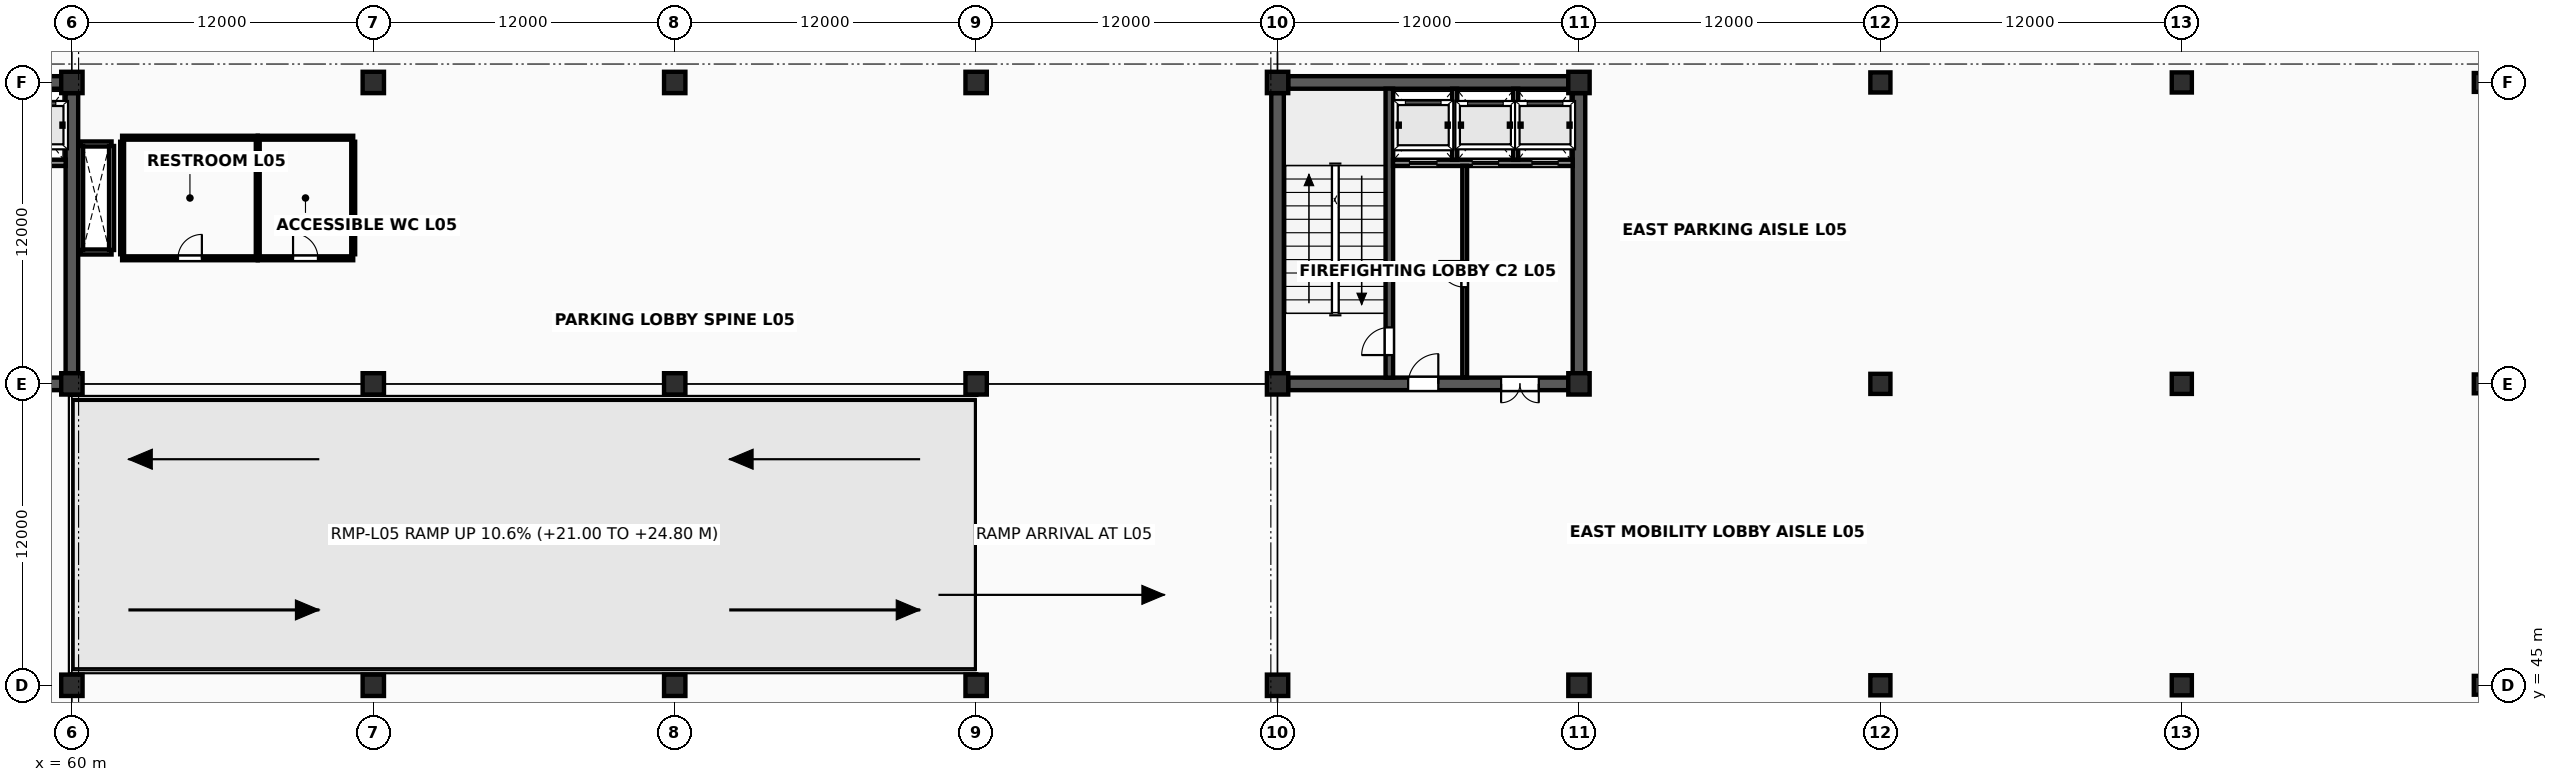
"""IFC4 building model, lengths in metres.
Left out: names, types, materials, properties, quantities, classifications, styles, units other than length and angle.
Written with IfcOpenShell. Run it as: python <this file> out.ifc"""

import sys

from ifc_helpers import new_model, si_unit, direction, frame, frame_2d, origin, origin_2d, place, context, subcontext, project, spatial, rectangle, extrude, element, fill, save


model = new_model("IFC4")
c1 = context("Model", 3, precision=1e-05, world=origin(), true_north=direction((0.0, 1.0)))
c2 = subcontext(c1, "Body", "Model", "MODEL_VIEW")
j1 = project(units=[si_unit("LENGTHUNIT", "METRE"), si_unit("PLANEANGLEUNIT", "RADIAN")], contexts=[c1])
p1 = place(None, origin())
s1 = spatial("IfcSite", under=j1, at=p1, CompositionType="ELEMENT")
p2 = place(p1, origin())
s2 = spatial("IfcBuilding", under=s1, at=p2, CompositionType="ELEMENT")
p3 = place(p2, frame((0.0, 0.0, 21.0)))
s3 = spatial("IfcBuildingStorey", under=s2, at=p3, CompositionType="ELEMENT", Elevation=21.0)
for number, where, z_axis, x_axis in (
    (1, (60.0, 45.0, 0.0), (0.0, 0.0, 1.0), (1.0, 0.0, 0.0)),
    (2, (60.0, 57.0, 0.0), (0.0, 0.0, 1.0), (1.0, 0.0, 0.0)),
    (3, (60.0, 69.0, 0.0), (0.0, 0.0, 1.0), (1.0, 0.0, 0.0)),
    (4, (72.0, 45.0, 0.0), (0.0, 0.0, 1.0), (1.0, 0.0, 0.0)),
    (5, (72.0, 57.0, 0.0), (0.0, 0.0, 1.0), (1.0, 0.0, 0.0)),
    (6, (72.0, 69.0, 0.0), (0.0, 0.0, 1.0), (1.0, 0.0, 0.0)),
    (7, (84.0, 45.0, 0.0), (0.0, 0.0, 1.0), (1.0, 0.0, 0.0)),
    (8, (84.0, 57.0, 0.0), (0.0, 0.0, 1.0), (1.0, 0.0, 0.0)),
    (9, (84.0, 69.0, 0.0), (0.0, 0.0, 1.0), (1.0, 0.0, 0.0)),
    (10, (96.0, 45.0, 0.0), (0.0, 0.0, 1.0), (1.0, 0.0, 0.0)),
    (11, (96.0, 57.0, 0.0), (0.0, 0.0, 1.0), (1.0, 0.0, 0.0)),
    (12, (96.0, 69.0, 0.0), (0.0, 0.0, 1.0), (1.0, 0.0, 0.0)),
    (13, (108.0, 45.0, 0.0), (0.0, 0.0, 1.0), (1.0, 0.0, 0.0)),
    (14, (108.0, 57.0, 0.0), (0.0, 0.0, 1.0), (1.0, 0.0, 0.0)),
    (15, (108.0, 69.0, 0.0), (0.0, 0.0, 1.0), (1.0, 0.0, 0.0)),
    (16, (120.0, 45.0, 0.0), (0.0, 0.0, 1.0), (1.0, 0.0, 0.0)),
    (17, (120.0, 57.0, 0.0), (0.0, 0.0, 1.0), (1.0, 0.0, 0.0)),
    (18, (120.0, 69.0, 0.0), (0.0, 0.0, 1.0), (1.0, 0.0, 0.0)),
):
    element("IfcColumn", number, at=place(p3, frame(where, z_axis=z_axis, x_axis=x_axis)), inside=s3, PredefinedType="COLUMN", context=c2, shape_type="SweptSolid", body=[
        extrude(rectangle(XDim=0.85, YDim=0.85, at=origin_2d()), origin(), (0.0, 0.0, 1.0), 3.8),
    ])
for number, where, z_axis, x_axis in (
    (19, (132.0, 45.0, 0.0), (0.0, 0.0, 1.0), (1.0, 0.0, 0.0)),
    (20, (132.0, 57.0, 0.0), (0.0, 0.0, 1.0), (1.0, 0.0, 0.0)),
    (21, (132.0, 69.0, 0.0), (0.0, 0.0, 1.0), (1.0, 0.0, 0.0)),
    (22, (144.0, 45.0, 0.0), (0.0, 0.0, 1.0), (1.0, 0.0, 0.0)),
    (23, (144.0, 57.0, 0.0), (0.0, 0.0, 1.0), (1.0, 0.0, 0.0)),
    (24, (144.0, 69.0, 0.0), (0.0, 0.0, 1.0), (1.0, 0.0, 0.0)),
):
    element("IfcColumn", number, at=place(p3, frame(where, z_axis=z_axis, x_axis=x_axis)), inside=s3, PredefinedType="COLUMN", context=c2, shape_type="SweptSolid", body=[
        extrude(rectangle(XDim=0.8, YDim=0.8, at=origin_2d()), origin(), (0.0, 0.0, 1.0), 3.8),
    ])
for number, where, z_axis, x_axis in (
    (25, (156.0, 45.0, 0.0), (0.0, 0.0, 1.0), (1.0, 0.0, 0.0)),
    (26, (156.0, 57.0, 0.0), (0.0, 0.0, 1.0), (1.0, 0.0, 0.0)),
    (27, (156.0, 69.0, 0.0), (0.0, 0.0, 1.0), (1.0, 0.0, 0.0)),
):
    element("IfcColumn", number, at=place(p3, frame(where, z_axis=z_axis, x_axis=x_axis)), inside=s3, PredefinedType="COLUMN", context=c2, shape_type="SweptSolid", body=[
        extrude(rectangle(XDim=0.75, YDim=0.75, at=origin_2d()), origin(), (0.0, 0.0, 1.0), 3.8),
    ])
for number, where, z_axis, x_axis in (
    (28, (60.347, 62.25, 0.0), (0.0, 0.0, 1.0), (1.0, 0.0, 0.0)),
    (29, (60.347, 66.55, 0.0), (0.0, 0.0, 1.0), (1.0, 0.0, 0.0)),
):
    element("IfcWall", number, at=place(p3, frame(where, z_axis=z_axis, x_axis=x_axis)), inside=s3, PredefinedType="SOLIDWALL", context=c2, shape_type="SweptSolid", body=[
        extrude(rectangle(XDim=1.233, YDim=0.2, at=frame_2d((0.617, 0.0))), origin(), (0.0, 0.0, 1.0), 3.638),
    ])
for number, where, z_axis, x_axis in (
    (30, (60.347, 62.33, 0.0), (0.0, 0.0, 1.0), (0.0, 1.0, 0.0)),
    (31, (61.58, 62.33, 0.0), (0.0, 0.0, 1.0), (0.0, 1.0, 0.0)),
):
    element("IfcWall", number, at=place(p3, frame(where, z_axis=z_axis, x_axis=x_axis)), inside=s3, PredefinedType="SOLIDWALL", context=c2, shape_type="SweptSolid", body=[
        extrude(rectangle(XDim=4.14, YDim=0.2, at=frame_2d((2.07, 0.0))), origin(), (0.0, 0.0, 1.0), 3.638),
    ])
p4 = place(p3, frame((48.422, 57.0, 0.0), z_axis=(0.0, 0.0, 1.0), x_axis=(1.0, 0.0, 0.0)))
e32 = element("IfcWall", 32, at=p4, inside=s3, PredefinedType="SHEAR", context=c2, shape_type="SweptSolid", body=[
    extrude(rectangle(XDim=11.156, YDim=0.5, at=frame_2d((5.578, 0.0))), origin(), (0.0, 0.0, 1.0), 3.638),
])
p5 = place(p4, frame((4.778, 0.0, 0.0)))
e33 = element("IfcOpeningElement", 33, at=p5, cuts=e32, PredefinedType="OPENING", context=c2, shape_type="SweptSolid", body=[
    extrude(rectangle(XDim=1.2, YDim=2.2, at=frame_2d((0.6, 1.1))), frame((0.0, 0.265, 0.0), z_axis=(0.0, -1.0, 0.0), x_axis=(1.0, 0.0, 0.0)), (0.0, 0.0, 1.0), 0.53),
])
p6 = place(p4, frame((8.478, 0.0, 0.0)))
e34 = element("IfcOpeningElement", 34, at=p6, cuts=e32, PredefinedType="OPENING", context=c2, shape_type="SweptSolid", body=[
    extrude(rectangle(XDim=1.5, YDim=2.25, at=frame_2d((0.75, 1.125))), frame((0.0, 0.265, 0.0), z_axis=(0.0, -1.0, 0.0), x_axis=(1.0, 0.0, 0.0)), (0.0, 0.0, 1.0), 0.53),
])
for number, where, z_axis, x_axis in (
    (35, (48.422, 69.0, 0.0), (0.0, 0.0, 1.0), (1.0, 0.0, 0.0)),
    (36, (60.0, 57.422, 0.0), (0.0, 0.0, 1.0), (0.0, 1.0, 0.0)),
):
    element("IfcWall", number, at=place(p3, frame(where, z_axis=z_axis, x_axis=x_axis)), inside=s3, PredefinedType="SHEAR", context=c2, shape_type="SweptSolid", body=[
        extrude(rectangle(XDim=11.156, YDim=0.5, at=frame_2d((5.578, 0.0))), origin(), (0.0, 0.0, 1.0), 3.638),
    ])
p7 = place(p3, frame((52.597, 65.8, 0.0), z_axis=(0.0, 0.0, 1.0), x_axis=(1.0, 0.0, 0.0)))
e37 = element("IfcWall", 37, at=p7, inside=s3, PredefinedType="SOLIDWALL", context=c2, shape_type="SweptSolid", body=[
    extrude(rectangle(XDim=7.156, YDim=0.25, at=frame_2d((3.578, 0.0))), origin(), (0.0, 0.0, 1.0), 3.638),
])
p8 = place(p7, frame((0.653, 0.0, 0.0)))
e38 = element("IfcOpeningElement", 38, at=p8, cuts=e37, PredefinedType="OPENING", context=c2, shape_type="SweptSolid", body=[
    extrude(rectangle(XDim=1.1, YDim=2.24, at=frame_2d((0.55, 1.12))), frame((0.0, 0.14, 0.0), z_axis=(0.0, -1.0, 0.0), x_axis=(1.0, 0.0, 0.0)), (0.0, 0.0, 1.0), 0.28),
])
p9 = place(p7, frame((3.153, 0.0, 0.0)))
e39 = element("IfcOpeningElement", 39, at=p9, cuts=e37, PredefinedType="OPENING", context=c2, shape_type="SweptSolid", body=[
    extrude(rectangle(XDim=1.05, YDim=2.2, at=frame_2d((0.525, 1.1))), frame((0.0, 0.14, 0.0), z_axis=(0.0, -1.0, 0.0), x_axis=(1.0, 0.0, 0.0)), (0.0, 0.0, 1.0), 0.28),
])
p10 = place(p7, frame((5.528, 0.0, 0.0)))
e40 = element("IfcOpeningElement", 40, at=p10, cuts=e37, PredefinedType="OPENING", context=c2, shape_type="SweptSolid", body=[
    extrude(rectangle(XDim=1.05, YDim=2.2, at=frame_2d((0.525, 1.1))), frame((0.0, 0.14, 0.0), z_axis=(0.0, -1.0, 0.0), x_axis=(1.0, 0.0, 0.0)), (0.0, 0.0, 1.0), 0.28),
])
p11 = place(p3, frame((108.422, 57.0, 0.0), z_axis=(0.0, 0.0, 1.0), x_axis=(1.0, 0.0, 0.0)))
e41 = element("IfcWall", 41, at=p11, inside=s3, PredefinedType="SHEAR", context=c2, shape_type="SweptSolid", body=[
    extrude(rectangle(XDim=11.156, YDim=0.5, at=frame_2d((5.578, 0.0))), origin(), (0.0, 0.0, 1.0), 3.638),
])
p12 = place(p11, frame((4.778, 0.0, 0.0)))
e42 = element("IfcOpeningElement", 42, at=p12, cuts=e41, PredefinedType="OPENING", context=c2, shape_type="SweptSolid", body=[
    extrude(rectangle(XDim=1.2, YDim=2.2, at=frame_2d((0.6, 1.1))), frame((0.0, 0.265, 0.0), z_axis=(0.0, -1.0, 0.0), x_axis=(1.0, 0.0, 0.0)), (0.0, 0.0, 1.0), 0.53),
])
p13 = place(p11, frame((8.478, 0.0, 0.0)))
e43 = element("IfcOpeningElement", 43, at=p13, cuts=e41, PredefinedType="OPENING", context=c2, shape_type="SweptSolid", body=[
    extrude(rectangle(XDim=1.5, YDim=2.25, at=frame_2d((0.75, 1.125))), frame((0.0, 0.265, 0.0), z_axis=(0.0, -1.0, 0.0), x_axis=(1.0, 0.0, 0.0)), (0.0, 0.0, 1.0), 0.53),
])
for number, where, z_axis, x_axis in (
    (44, (108.422, 69.0, 0.0), (0.0, 0.0, 1.0), (1.0, 0.0, 0.0)),
    (45, (108.0, 57.422, 0.0), (0.0, 0.0, 1.0), (0.0, 1.0, 0.0)),
    (46, (120.0, 57.422, 0.0), (0.0, 0.0, 1.0), (0.0, 1.0, 0.0)),
):
    element("IfcWall", number, at=place(p3, frame(where, z_axis=z_axis, x_axis=x_axis)), inside=s3, PredefinedType="SHEAR", context=c2, shape_type="SweptSolid", body=[
        extrude(rectangle(XDim=11.156, YDim=0.5, at=frame_2d((5.578, 0.0))), origin(), (0.0, 0.0, 1.0), 3.638),
    ])
p14 = place(p3, frame((112.45, 57.247, 0.0), z_axis=(0.0, 0.0, 1.0), x_axis=(0.0, 1.0, 0.0)))
e47 = element("IfcWall", 47, at=p14, inside=s3, PredefinedType="SHEAR", context=c2, shape_type="SweptSolid", body=[
    extrude(rectangle(XDim=11.506, YDim=0.3, at=frame_2d((5.753, 0.0))), origin(), (0.0, 0.0, 1.0), 3.638),
])
p15 = place(p14, frame((0.9, 0.0, 0.0)))
e48 = element("IfcOpeningElement", 48, at=p15, cuts=e47, PredefinedType="OPENING", context=c2, shape_type="SweptSolid", body=[
    extrude(rectangle(XDim=1.1, YDim=2.2, at=frame_2d((0.55, 1.1))), frame((0.0, 0.165, 0.0), z_axis=(0.0, -1.0, 0.0), x_axis=(1.0, 0.0, 0.0)), (0.0, 0.0, 1.0), 0.33),
])
p16 = place(p3, frame((112.597, 65.8, 0.0), z_axis=(0.0, 0.0, 1.0), x_axis=(1.0, 0.0, 0.0)))
e49 = element("IfcWall", 49, at=p16, inside=s3, PredefinedType="SOLIDWALL", context=c2, shape_type="SweptSolid", body=[
    extrude(rectangle(XDim=7.156, YDim=0.25, at=frame_2d((3.578, 0.0))), origin(), (0.0, 0.0, 1.0), 3.638),
])
p17 = place(p16, frame((0.653, 0.0, 0.0)))
e50 = element("IfcOpeningElement", 50, at=p17, cuts=e49, PredefinedType="OPENING", context=c2, shape_type="SweptSolid", body=[
    extrude(rectangle(XDim=1.1, YDim=2.24, at=frame_2d((0.55, 1.12))), frame((0.0, 0.14, 0.0), z_axis=(0.0, -1.0, 0.0), x_axis=(1.0, 0.0, 0.0)), (0.0, 0.0, 1.0), 0.28),
])
p18 = place(p16, frame((3.153, 0.0, 0.0)))
e51 = element("IfcOpeningElement", 51, at=p18, cuts=e49, PredefinedType="OPENING", context=c2, shape_type="SweptSolid", body=[
    extrude(rectangle(XDim=1.05, YDim=2.2, at=frame_2d((0.525, 1.1))), frame((0.0, 0.14, 0.0), z_axis=(0.0, -1.0, 0.0), x_axis=(1.0, 0.0, 0.0)), (0.0, 0.0, 1.0), 0.28),
])
p19 = place(p16, frame((5.528, 0.0, 0.0)))
e52 = element("IfcOpeningElement", 52, at=p19, cuts=e49, PredefinedType="OPENING", context=c2, shape_type="SweptSolid", body=[
    extrude(rectangle(XDim=1.05, YDim=2.2, at=frame_2d((0.525, 1.1))), frame((0.0, 0.14, 0.0), z_axis=(0.0, -1.0, 0.0), x_axis=(1.0, 0.0, 0.0)), (0.0, 0.0, 1.0), 0.28),
])
for number, where, z_axis, x_axis in (
    (53, (115.05, 65.92, 0.0), (0.0, 0.0, 1.0), (0.0, 1.0, 0.0)),
    (54, (117.48, 65.92, 0.0), (0.0, 0.0, 1.0), (0.0, 1.0, 0.0)),
):
    element("IfcWall", number, at=place(p3, frame(where, z_axis=z_axis, x_axis=x_axis)), inside=s3, PredefinedType="SOLIDWALL", context=c2, shape_type="SweptSolid", body=[
        extrude(rectangle(XDim=2.83, YDim=0.2, at=frame_2d((1.415, 0.0))), origin(), (0.0, 0.0, 1.0), 3.628),
    ])
p20 = place(p3, frame((115.45, 57.25, 0.0), z_axis=(0.0, 0.0, 1.0), x_axis=(0.0, 1.0, 0.0)))
e55 = element("IfcWall", 55, at=p20, inside=s3, PredefinedType="SOLIDWALL", context=c2, shape_type="SweptSolid", body=[
    extrude(rectangle(XDim=8.43, YDim=0.19, at=frame_2d((4.215, 0.0))), origin(), (0.0, 0.0, 1.0), 3.628),
])
p21 = place(p20, frame((3.6, 0.0, 0.0)))
e56 = element("IfcOpeningElement", 56, at=p21, cuts=e55, PredefinedType="OPENING", context=c2, shape_type="SweptSolid", body=[
    extrude(rectangle(XDim=1.04, YDim=2.18, at=frame_2d((0.52, 1.09))), frame((0.0, 0.11, 0.0), z_axis=(0.0, -1.0, 0.0), x_axis=(1.0, 0.0, 0.0)), (0.0, 0.0, 1.0), 0.22),
])
p22 = place(p3, frame((62.0, 62.0, 0.0), z_axis=(0.0, 0.0, 1.0), x_axis=(1.0, 0.0, 0.0)))
e57 = element("IfcWall", 57, at=p22, inside=s3, PredefinedType="PLUMBINGWALL", context=c2, shape_type="SweptSolid", body=[
    extrude(rectangle(XDim=5.4, YDim=0.155, at=frame_2d((2.7, 0.0))), origin(), (0.0, 0.0, 1.0), 2.75),
])
p23 = place(p22, frame((2.225, 0.0, 0.0)))
e58 = element("IfcOpeningElement", 58, at=p23, cuts=e57, PredefinedType="OPENING", context=c2, shape_type="SweptSolid", body=[
    extrude(rectangle(XDim=0.95, YDim=2.13, at=frame_2d((0.475, 1.065))), frame((0.0, 0.093, 0.0), z_axis=(0.0, -1.0, 0.0), x_axis=(1.0, 0.0, 0.0)), (0.0, 0.0, 1.0), 0.185),
])
p24 = place(p3, frame((62.0, 66.8, 0.0), z_axis=(0.0, 0.0, 1.0), x_axis=(1.0, 0.0, 0.0)))
e59 = element("IfcWall", 59, at=p24, inside=s3, PredefinedType="PLUMBINGWALL", context=c2, shape_type="SweptSolid", body=[
    extrude(rectangle(XDim=5.4, YDim=0.155, at=frame_2d((2.7, 0.0))), origin(), (0.0, 0.0, 1.0), 2.75),
])
for number, where, z_axis, x_axis in (
    (60, (62.0, 62.16, 0.0), (0.0, 0.0, 1.0), (0.0, 1.0, 0.0)),
    (61, (67.4, 62.16, 0.0), (0.0, 0.0, 1.0), (0.0, 1.0, 0.0)),
):
    element("IfcWall", number, at=place(p3, frame(where, z_axis=z_axis, x_axis=x_axis)), inside=s3, PredefinedType="PLUMBINGWALL", context=c2, shape_type="SweptSolid", body=[
        extrude(rectangle(XDim=4.48, YDim=0.155, at=frame_2d((2.24, 0.0))), origin(), (0.0, 0.0, 1.0), 2.75),
    ])
p25 = place(p3, frame((67.4, 62.0, 0.0), z_axis=(0.0, 0.0, 1.0), x_axis=(1.0, 0.0, 0.0)))
e62 = element("IfcWall", 62, at=p25, inside=s3, PredefinedType="PLUMBINGWALL", context=c2, shape_type="SweptSolid", body=[
    extrude(rectangle(XDim=3.8, YDim=0.155, at=frame_2d((1.9, 0.0))), origin(), (0.0, 0.0, 1.0), 2.75),
])
p26 = place(p25, frame((1.405, 0.0, 0.0)))
e63 = element("IfcOpeningElement", 63, at=p26, cuts=e62, PredefinedType="OPENING", context=c2, shape_type="SweptSolid", body=[
    extrude(rectangle(XDim=0.99, YDim=2.15, at=frame_2d((0.495, 1.075))), frame((0.0, 0.093, 0.0), z_axis=(0.0, -1.0, 0.0), x_axis=(1.0, 0.0, 0.0)), (0.0, 0.0, 1.0), 0.185),
])
p27 = place(p3, frame((67.4, 66.8, 0.0), z_axis=(0.0, 0.0, 1.0), x_axis=(1.0, 0.0, 0.0)))
e64 = element("IfcWall", 64, at=p27, inside=s3, PredefinedType="PLUMBINGWALL", context=c2, shape_type="SweptSolid", body=[
    extrude(rectangle(XDim=3.8, YDim=0.155, at=frame_2d((1.9, 0.0))), origin(), (0.0, 0.0, 1.0), 2.75),
])
p28 = place(p3, frame((71.2, 62.16, 0.0), z_axis=(0.0, 0.0, 1.0), x_axis=(0.0, 1.0, 0.0)))
e65 = element("IfcWall", 65, at=p28, inside=s3, PredefinedType="PLUMBINGWALL", context=c2, shape_type="SweptSolid", body=[
    extrude(rectangle(XDim=4.48, YDim=0.155, at=frame_2d((2.24, 0.0))), origin(), (0.0, 0.0, 1.0), 2.75),
])
p29 = place(p15, origin())
e66 = element("IfcDoor", 66, at=p29, inside=s3, OperationType="SINGLE_SWING_LEFT", PredefinedType="DOOR", context=c2, shape_type="SweptSolid", body=[
    extrude(rectangle(XDim=1.1, YDim=2.2, at=frame_2d((0.55, 1.1))), frame((0.0, 0.025, 0.0), z_axis=(0.0, -1.0, 0.0), x_axis=(1.0, 0.0, 0.0)), (0.0, 0.0, 1.0), 0.05),
])
fill(e48, e66)
p30 = place(p21, origin())
e67 = element("IfcDoor", 67, at=p30, inside=s3, OperationType="SINGLE_SWING_RIGHT", PredefinedType="DOOR", context=c2, shape_type="SweptSolid", body=[
    extrude(rectangle(XDim=1.04, YDim=2.18, at=frame_2d((0.52, 1.09))), frame((0.0, 0.025, 0.0), z_axis=(0.0, -1.0, 0.0), x_axis=(1.0, 0.0, 0.0)), (0.0, 0.0, 1.0), 0.05),
])
fill(e56, e67)
p31 = place(p12, origin())
e68 = element("IfcDoor", 68, at=p31, inside=s3, OperationType="SINGLE_SWING_RIGHT", PredefinedType="DOOR", context=c2, shape_type="SweptSolid", body=[
    extrude(rectangle(XDim=1.2, YDim=2.2, at=frame_2d((0.6, 1.1))), frame((0.0, 0.025, 0.0), z_axis=(0.0, -1.0, 0.0), x_axis=(1.0, 0.0, 0.0)), (0.0, 0.0, 1.0), 0.05),
])
fill(e42, e68)
p32 = place(p13, origin())
e69 = element("IfcDoor", 69, at=p32, inside=s3, OperationType="DOUBLE_DOOR_SINGLE_SWING", PredefinedType="DOOR", context=c2, shape_type="SweptSolid", body=[
    extrude(rectangle(XDim=1.5, YDim=2.25, at=frame_2d((0.75, 1.125))), frame((0.0, 0.025, 0.0), z_axis=(0.0, -1.0, 0.0), x_axis=(1.0, 0.0, 0.0)), (0.0, 0.0, 1.0), 0.05),
])
fill(e43, e69)
p33 = place(p17, origin())
e70 = element("IfcDoor", 70, at=p33, inside=s3, OperationType="SLIDING_TO_LEFT", PredefinedType="USERDEFINED", context=c2, shape_type="SweptSolid", body=[
    extrude(rectangle(XDim=1.1, YDim=2.24, at=frame_2d((0.55, 1.12))), frame((0.0, 0.025, 0.0), z_axis=(0.0, -1.0, 0.0), x_axis=(1.0, 0.0, 0.0)), (0.0, 0.0, 1.0), 0.05),
])
fill(e50, e70)
p34 = place(p18, origin())
e71 = element("IfcDoor", 71, at=p34, inside=s3, OperationType="SLIDING_TO_LEFT", PredefinedType="USERDEFINED", context=c2, shape_type="SweptSolid", body=[
    extrude(rectangle(XDim=1.05, YDim=2.2, at=frame_2d((0.525, 1.1))), frame((0.0, 0.025, 0.0), z_axis=(0.0, -1.0, 0.0), x_axis=(1.0, 0.0, 0.0)), (0.0, 0.0, 1.0), 0.05),
])
fill(e51, e71)
p35 = place(p19, origin())
e72 = element("IfcDoor", 72, at=p35, inside=s3, OperationType="SLIDING_TO_LEFT", PredefinedType="USERDEFINED", context=c2, shape_type="SweptSolid", body=[
    extrude(rectangle(XDim=1.05, YDim=2.2, at=frame_2d((0.525, 1.1))), frame((0.0, 0.025, 0.0), z_axis=(0.0, -1.0, 0.0), x_axis=(1.0, 0.0, 0.0)), (0.0, 0.0, 1.0), 0.05),
])
fill(e52, e72)
p36 = place(p23, origin())
e73 = element("IfcDoor", 73, at=p36, inside=s3, OperationType="SINGLE_SWING_RIGHT", PredefinedType="DOOR", context=c2, shape_type="SweptSolid", body=[
    extrude(rectangle(XDim=0.95, YDim=2.13, at=frame_2d((0.475, 1.065))), frame((0.0, 0.025, 0.0), z_axis=(0.0, -1.0, 0.0), x_axis=(1.0, 0.0, 0.0)), (0.0, 0.0, 1.0), 0.05),
])
fill(e58, e73)
p37 = place(p26, origin())
e74 = element("IfcDoor", 74, at=p37, inside=s3, OperationType="SINGLE_SWING_LEFT", PredefinedType="DOOR", context=c2, shape_type="SweptSolid", body=[
    extrude(rectangle(XDim=0.99, YDim=2.15, at=frame_2d((0.495, 1.075))), frame((0.0, 0.025, 0.0), z_axis=(0.0, -1.0, 0.0), x_axis=(1.0, 0.0, 0.0)), (0.0, 0.0, 1.0), 0.05),
])
fill(e63, e74)
save(model, sys.argv[1])
